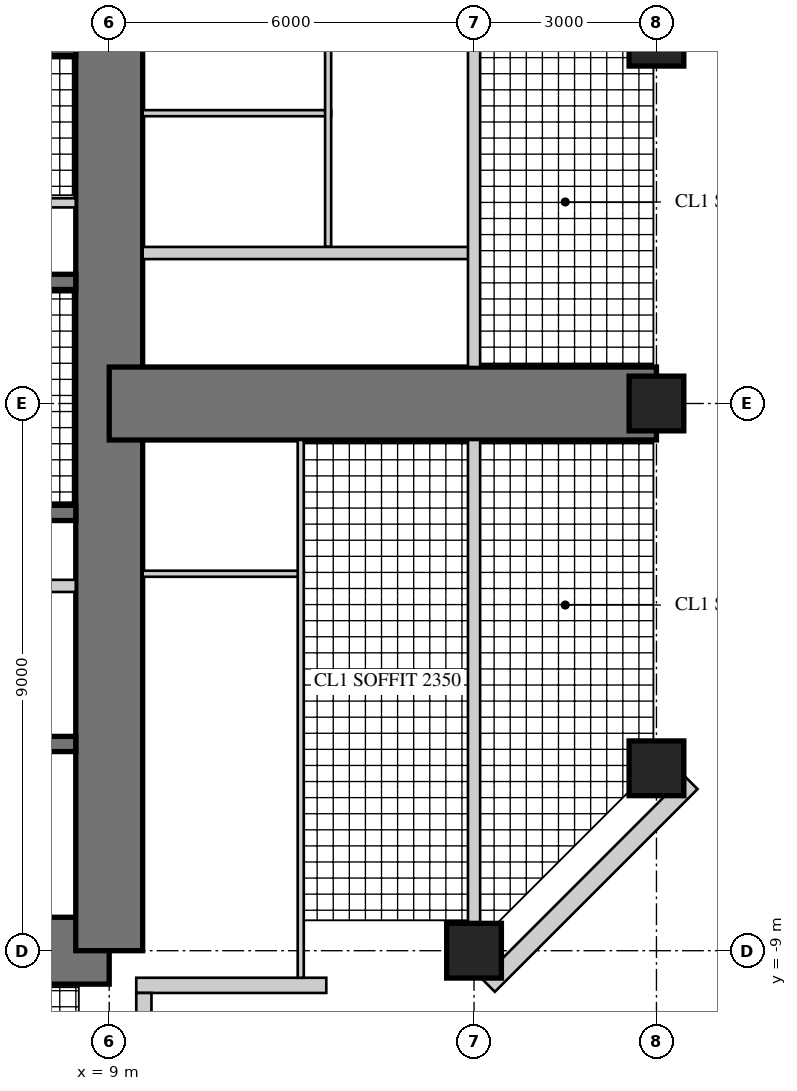
"""IFC4 building model, lengths in metres.
Left out: names, types, materials, properties, quantities, classifications, styles, units other than length and angle.
Written with IfcOpenShell. Run it as: python <this file> out.ifc"""

import sys

from ifc_helpers import new_model, si_unit, direction, frame, frame_2d, origin, origin_2d, place, context, subcontext, project, spatial, rectangle, hollow_rectangle, extrude, element, fill, save


model = new_model("IFC4")
c1 = context("Model", 3, precision=1e-05, world=origin(), true_north=direction((0.0, 1.0)))
c2 = subcontext(c1, "Body", "Model", "MODEL_VIEW")
j1 = project(units=[si_unit("LENGTHUNIT", "METRE"), si_unit("PLANEANGLEUNIT", "RADIAN")], contexts=[c1])
p1 = place(None, origin())
s1 = spatial("IfcSite", under=j1, at=p1, CompositionType="ELEMENT")
p2 = place(p1, origin())
s2 = spatial("IfcBuilding", under=s1, at=p2, CompositionType="ELEMENT")
p3 = place(p2, frame((0.0, 0.0, 179.7)))
s3 = spatial("IfcBuildingStorey", under=s2, at=p3, CompositionType="ELEMENT", Elevation=179.7)
p4 = place(p3, frame((-9.0, -9.0, 0.0), z_axis=(0.0, 0.0, 1.0), x_axis=(1.0, 0.0, 0.0)))
e1 = element("IfcWall", 1, at=p4, inside=s3, PredefinedType="SHEAR", context=c2, shape_type="SweptSolid", body=[
    extrude(rectangle(XDim=18.0, YDim=1.1, at=frame_2d((9.0, 0.0))), origin(), (0.0, 0.0, 1.0), 3.4),
])
p5 = place(p4, frame((9.8, 0.0, 0.0)))
e2 = element("IfcOpeningElement", 2, at=p5, cuts=e1, PredefinedType="OPENING", context=c2, shape_type="SweptSolid", body=[
    extrude(rectangle(XDim=1.0, YDim=2.4, at=frame_2d((0.5, 1.2))), frame((0.0, 0.56, 0.0), z_axis=(0.0, -1.0, 0.0), x_axis=(1.0, 0.0, 0.0)), (0.0, 0.0, 1.0), 1.12),
])
p6 = place(p3, frame((9.0, -9.0, 0.0), z_axis=(0.0, 0.0, 1.0), x_axis=(0.0, 1.0, 0.0)))
e3 = element("IfcWall", 3, at=p6, inside=s3, PredefinedType="SHEAR", context=c2, shape_type="SweptSolid", body=[
    extrude(rectangle(XDim=18.0, YDim=1.1, at=frame_2d((9.0, 0.0))), origin(), (0.0, 0.0, 1.0), 3.4),
])
p7 = place(p6, frame((9.8, 0.0, 0.0)))
e4 = element("IfcOpeningElement", 4, at=p7, cuts=e3, PredefinedType="OPENING", context=c2, shape_type="SweptSolid", body=[
    extrude(rectangle(XDim=1.0, YDim=2.4, at=frame_2d((0.5, 1.2))), frame((0.0, 0.56, 0.0), z_axis=(0.0, -1.0, 0.0), x_axis=(1.0, 0.0, 0.0)), (0.0, 0.0, 1.0), 1.12),
])
p8 = place(p3, frame((1.925, 2.0, 0.0), z_axis=(0.0, 0.0, 1.0), x_axis=(1.0, 0.0, 0.0)))
e5 = element("IfcWall", 5, at=p8, inside=s3, PredefinedType="SHEAR", context=c2, shape_type="SweptSolid", body=[
    extrude(rectangle(XDim=6.525, YDim=0.25, at=frame_2d((3.262, 0.0))), origin(), (0.0, 0.0, 1.0), 3.4),
])
p9 = place(p3, frame((1.925, 5.85, 0.0), z_axis=(0.0, 0.0, 1.0), x_axis=(1.0, 0.0, 0.0)))
e6 = element("IfcWall", 6, at=p9, inside=s3, PredefinedType="SHEAR", context=c2, shape_type="SweptSolid", body=[
    extrude(rectangle(XDim=6.525, YDim=0.25, at=frame_2d((3.262, 0.0))), origin(), (0.0, 0.0, 1.0), 3.4),
])
p10 = place(p9, frame((0.521, 0.0, 0.0)))
e7 = element("IfcOpeningElement", 7, at=p10, cuts=e6, PredefinedType="OPENING", context=c2, shape_type="SweptSolid", body=[
    extrude(rectangle(XDim=1.0, YDim=2.1, at=frame_2d((0.5, 1.05))), frame((0.0, 0.135, 0.0), z_axis=(0.0, -1.0, 0.0), x_axis=(1.0, 0.0, 0.0)), (0.0, 0.0, 1.0), 0.27),
])
p11 = place(p3, frame((1.925, 3.3, 0.0), z_axis=(0.0, 0.0, 1.0), x_axis=(1.0, 0.0, 0.0)))
e8 = element("IfcWall", 8, at=p11, inside=s3, PredefinedType="PARTITIONING", context=c2, shape_type="SweptSolid", body=[
    extrude(rectangle(XDim=6.525, YDim=0.15, at=frame_2d((3.262, 0.0))), origin(), (0.0, 0.0, 1.0), 3.4),
])
p12 = place(p11, frame((0.075, 0.0, 0.0)))
e9 = element("IfcOpeningElement", 9, at=p12, cuts=e8, PredefinedType="OPENING", context=c2, shape_type="SweptSolid", body=[
    extrude(rectangle(XDim=0.8, YDim=2.1, at=frame_2d((0.4, 1.05))), frame((0.0, 0.085, 0.0), z_axis=(0.0, -1.0, 0.0), x_axis=(1.0, 0.0, 0.0)), (0.0, 0.0, 1.0), 0.17),
])
p13 = place(p11, frame((3.675, 0.0, 0.0)))
e10 = element("IfcOpeningElement", 10, at=p13, cuts=e8, PredefinedType="OPENING", context=c2, shape_type="SweptSolid", body=[
    extrude(rectangle(XDim=0.8, YDim=2.1, at=frame_2d((0.4, 1.05))), frame((0.0, 0.085, 0.0), z_axis=(0.0, -1.0, 0.0), x_axis=(1.0, 0.0, 0.0)), (0.0, 0.0, 1.0), 0.17),
])
p14 = place(p3, frame((2.125, -1.8, 0.0), z_axis=(0.0, 0.0, 1.0), x_axis=(1.0, 0.0, 0.0)))
e11 = element("IfcWall", 11, at=p14, inside=s3, PredefinedType="SHEAR", context=c2, shape_type="SweptSolid", body=[
    extrude(rectangle(XDim=6.325, YDim=0.25, at=frame_2d((3.163, 0.0))), origin(), (0.0, 0.0, 1.0), 3.4),
])
p15 = place(p3, frame((2.125, -5.6, 0.0), z_axis=(0.0, 0.0, 1.0), x_axis=(1.0, 0.0, 0.0)))
e12 = element("IfcWall", 12, at=p15, inside=s3, PredefinedType="SHEAR", context=c2, shape_type="SweptSolid", body=[
    extrude(rectangle(XDim=6.325, YDim=0.25, at=frame_2d((3.163, 0.0))), origin(), (0.0, 0.0, 1.0), 3.4),
])
p16 = place(p15, frame((0.175, 0.0, 0.0)))
e13 = element("IfcOpeningElement", 13, at=p16, cuts=e12, PredefinedType="OPENING", context=c2, shape_type="SweptSolid", body=[
    extrude(rectangle(XDim=1.0, YDim=2.1, at=frame_2d((0.5, 1.05))), frame((0.0, 0.135, 0.0), z_axis=(0.0, -1.0, 0.0), x_axis=(1.0, 0.0, 0.0)), (0.0, 0.0, 1.0), 0.27),
])
p17 = place(p3, frame((5.725, -3.0, 0.0), z_axis=(0.0, 0.0, 1.0), x_axis=(1.0, 0.0, 0.0)))
e14 = element("IfcWall", 14, at=p17, inside=s3, PredefinedType="PARTITIONING", context=c2, shape_type="SweptSolid", body=[
    extrude(rectangle(XDim=2.725, YDim=0.2, at=frame_2d((1.362, 0.0))), origin(), (0.0, 0.0, 1.0), 3.4),
])
p18 = place(p3, frame((9.0, 0.0, 0.0), z_axis=(0.0, 0.0, 1.0), x_axis=(1.0, 0.0, 0.0)))
e15 = element("IfcWall", 15, at=p18, inside=s3, PredefinedType="SHEAR", context=c2, shape_type="SweptSolid", body=[
    extrude(rectangle(XDim=9.0, YDim=1.2, at=frame_2d((4.5, 0.0))), origin(), (0.0, 0.0, 1.0), 3.4),
])
p19 = place(p18, frame((3.95, 0.0, 0.0)))
e16 = element("IfcOpeningElement", 16, at=p19, cuts=e15, PredefinedType="OPENING", context=c2, shape_type="SweptSolid", body=[
    extrude(rectangle(XDim=1.0, YDim=2.15, at=frame_2d((0.5, 1.075))), frame((0.0, 0.61, 0.0), z_axis=(0.0, -1.0, 0.0), x_axis=(1.0, 0.0, 0.0)), (0.0, 0.0, 1.0), 1.22),
])
p20 = place(p18, frame((7.0, 0.0, 0.0)))
e17 = element("IfcOpeningElement", 17, at=p20, cuts=e15, PredefinedType="OPENING", context=c2, shape_type="SweptSolid", body=[
    extrude(rectangle(XDim=1.0, YDim=2.2, at=frame_2d((0.5, 1.1))), frame((0.0, 0.61, 0.0), z_axis=(0.0, -1.0, 0.0), x_axis=(1.0, 0.0, 0.0)), (0.0, 0.0, 1.0), 1.22),
])
for number, where, z_axis, x_axis in (
    (18, (15.0, -9.0, 0.0), (0.0, 0.0, 1.0), (1.0, 0.0, 0.0)),
    (19, (18.0, -6.0, 0.0), (0.0, 0.0, 1.0), (1.0, 0.0, 0.0)),
    (20, (18.0, 0.0, 0.0), (0.0, 0.0, 1.0), (1.0, 0.0, 0.0)),
    (21, (18.0, 6.0, 0.0), (0.0, 0.0, 1.0), (1.0, 0.0, 0.0)),
):
    element("IfcColumn", number, at=place(p3, frame(where, z_axis=z_axis, x_axis=x_axis)), inside=s3, PredefinedType="COLUMN", context=c2, shape_type="SweptSolid", body=[
        extrude(rectangle(XDim=0.9, YDim=0.9, at=origin_2d()), origin(), (0.0, 0.0, 1.0), 3.4),
    ])
p21 = place(p3, frame((9.445, -9.57, 0.0), z_axis=(0.0, 0.0, 1.0), x_axis=(1.0, 0.0, 0.0)))
e22 = element("IfcWall", 22, at=p21, inside=s3, PredefinedType="SOLIDWALL", context=c2, shape_type="SweptSolid", body=[
    extrude(rectangle(XDim=3.125, YDim=0.25, at=frame_2d((1.562, 0.0))), origin(), (0.0, 0.0, 1.0), 3.22),
])
p22 = place(p21, frame((0.6, 0.0, 0.0)))
e23 = element("IfcOpeningElement", 23, at=p22, cuts=e22, PredefinedType="OPENING", context=c2, shape_type="SweptSolid", body=[
    extrude(rectangle(XDim=1.0, YDim=2.2, at=frame_2d((0.5, 1.1))), frame((0.0, 0.135, 0.0), z_axis=(0.0, -1.0, 0.0), x_axis=(1.0, 0.0, 0.0)), (0.0, 0.0, 1.0), 0.27),
])
p23 = place(p3, frame((15.236, -9.57, 0.0), z_axis=(0.0, 0.0, 1.0), x_axis=(0.707106781187, 0.707106781187, 0.0)))
e24 = element("IfcWall", 24, at=p23, inside=s3, PredefinedType="SOLIDWALL", context=c2, shape_type="SweptSolid", body=[
    extrude(rectangle(XDim=4.715, YDim=0.3, at=frame_2d((2.357, 0.0))), origin(), (0.0, 0.0, 1.0), 3.22),
])
p24 = place(p23, frame((1.907, 0.0, 0.3)))
e25 = element("IfcOpeningElement", 25, at=p24, cuts=e24, PredefinedType="OPENING", context=c2, shape_type="SweptSolid", body=[
    extrude(rectangle(XDim=0.9, YDim=2.4, at=frame_2d((0.45, 1.2))), frame((0.0, 0.16, 0.0), z_axis=(0.0, -1.0, 0.0), x_axis=(1.0, 0.0, 0.0)), (0.0, 0.0, 1.0), 0.32),
])
p25 = place(p3, frame((9.57, -12.57, 0.0), z_axis=(0.0, 0.0, 1.0), x_axis=(0.0, 1.0, 0.0)))
e26 = element("IfcWall", 26, at=p25, inside=s3, PredefinedType="SOLIDWALL", context=c2, shape_type="SweptSolid", body=[
    extrude(rectangle(XDim=2.875, YDim=0.25, at=frame_2d((1.438, 0.0))), origin(), (0.0, 0.0, 1.0), 3.22),
])
p26 = place(p25, frame((0.6, 0.0, 0.0)))
e27 = element("IfcOpeningElement", 27, at=p26, cuts=e26, PredefinedType="OPENING", context=c2, shape_type="SweptSolid", body=[
    extrude(rectangle(XDim=1.0, YDim=2.2, at=frame_2d((0.5, 1.1))), frame((0.0, 0.135, 0.0), z_axis=(0.0, -1.0, 0.0), x_axis=(1.0, 0.0, 0.0)), (0.0, 0.0, 1.0), 0.27),
])
p27 = place(p3, frame((9.55, 4.775, 0.0), z_axis=(0.0, 0.0, 1.0), x_axis=(1.0, 0.0, 0.0)))
e28 = element("IfcWall", 28, at=p27, inside=s3, PredefinedType="PARTITIONING", context=c2, shape_type="SweptSolid", body=[
    extrude(rectangle(XDim=3.1, YDim=0.1, at=frame_2d((1.55, 0.0))), origin(), (0.0, 0.0, 1.0), 3.22),
])
p28 = place(p3, frame((12.6, 2.575, 0.0), z_axis=(0.0, 0.0, 1.0), x_axis=(0.0, 1.0, 0.0)))
e29 = element("IfcWall", 29, at=p28, inside=s3, PredefinedType="PARTITIONING", context=c2, shape_type="SweptSolid", body=[
    extrude(rectangle(XDim=6.87, YDim=0.1, at=frame_2d((3.435, 0.0))), origin(), (0.0, 0.0, 1.0), 3.22),
])
p29 = place(p28, frame((0.55, 0.0, 0.0)))
e30 = element("IfcOpeningElement", 30, at=p29, cuts=e29, PredefinedType="OPENING", context=c2, shape_type="SweptSolid", body=[
    extrude(rectangle(XDim=0.9, YDim=2.1, at=frame_2d((0.45, 1.05))), frame((0.0, 0.06, 0.0), z_axis=(0.0, -1.0, 0.0), x_axis=(1.0, 0.0, 0.0)), (0.0, 0.0, 1.0), 0.12),
])
p30 = place(p28, frame((2.65, 0.0, 0.0)))
e31 = element("IfcOpeningElement", 31, at=p30, cuts=e29, PredefinedType="OPENING", context=c2, shape_type="SweptSolid", body=[
    extrude(rectangle(XDim=0.9, YDim=2.1, at=frame_2d((0.45, 1.05))), frame((0.0, 0.06, 0.0), z_axis=(0.0, -1.0, 0.0), x_axis=(1.0, 0.0, 0.0)), (0.0, 0.0, 1.0), 0.12),
])
p31 = place(p3, frame((9.55, -2.8, 0.0), z_axis=(0.0, 0.0, 1.0), x_axis=(1.0, 0.0, 0.0)))
e32 = element("IfcWall", 32, at=p31, inside=s3, PredefinedType="PARTITIONING", context=c2, shape_type="SweptSolid", body=[
    extrude(rectangle(XDim=2.65, YDim=0.1, at=frame_2d((1.325, 0.0))), origin(), (0.0, 0.0, 1.0), 3.22),
])
p32 = place(p3, frame((12.15, -9.445, 0.0), z_axis=(0.0, 0.0, 1.0), x_axis=(0.0, 1.0, 0.0)))
e33 = element("IfcWall", 33, at=p32, inside=s3, PredefinedType="PARTITIONING", context=c2, shape_type="SweptSolid", body=[
    extrude(rectangle(XDim=8.845, YDim=0.1, at=frame_2d((4.422, 0.0))), origin(), (0.0, 0.0, 1.0), 3.22),
])
p33 = place(p32, frame((5.295, 0.0, 0.0)))
e34 = element("IfcOpeningElement", 34, at=p33, cuts=e33, PredefinedType="OPENING", context=c2, shape_type="SweptSolid", body=[
    extrude(rectangle(XDim=0.9, YDim=2.1, at=frame_2d((0.45, 1.05))), frame((0.0, 0.06, 0.0), z_axis=(0.0, -1.0, 0.0), x_axis=(1.0, 0.0, 0.0)), (0.0, 0.0, 1.0), 0.12),
])
p34 = place(p32, frame((7.395, 0.0, 0.0)))
e35 = element("IfcOpeningElement", 35, at=p34, cuts=e33, PredefinedType="OPENING", context=c2, shape_type="SweptSolid", body=[
    extrude(rectangle(XDim=0.9, YDim=2.1, at=frame_2d((0.45, 1.05))), frame((0.0, 0.06, 0.0), z_axis=(0.0, -1.0, 0.0), x_axis=(1.0, 0.0, 0.0)), (0.0, 0.0, 1.0), 0.12),
])
p35 = place(p3, frame((9.55, 2.475, 0.0), z_axis=(0.0, 0.0, 1.0), x_axis=(1.0, 0.0, 0.0)))
e36 = element("IfcWall", 36, at=p35, inside=s3, PredefinedType="SOLIDWALL", context=c2, shape_type="SweptSolid", body=[
    extrude(rectangle(XDim=5.45, YDim=0.2, at=frame_2d((2.725, 0.0))), origin(), (0.0, 0.0, 1.0), 3.22),
])
p36 = place(p35, frame((3.6, 0.0, 0.0)))
e37 = element("IfcOpeningElement", 37, at=p36, cuts=e36, PredefinedType="OPENING", context=c2, shape_type="SweptSolid", body=[
    extrude(rectangle(XDim=1.0, YDim=2.15, at=frame_2d((0.5, 1.075))), frame((0.0, 0.11, 0.0), z_axis=(0.0, -1.0, 0.0), x_axis=(1.0, 0.0, 0.0)), (0.0, 0.0, 1.0), 0.22),
])
p37 = place(p3, frame((15.0, -8.55, 0.0), z_axis=(0.0, 0.0, 1.0), x_axis=(0.0, 1.0, 0.0)))
e38 = element("IfcWall", 38, at=p37, inside=s3, PredefinedType="SOLIDWALL", context=c2, shape_type="SweptSolid", body=[
    extrude(rectangle(XDim=7.95, YDim=0.2, at=frame_2d((3.975, 0.0))), origin(), (0.0, 0.0, 1.0), 2.47),
])
p38 = place(p3, frame((15.0, 0.6, 0.0), z_axis=(0.0, 0.0, 1.0), x_axis=(0.0, 1.0, 0.0)))
e39 = element("IfcWall", 39, at=p38, inside=s3, PredefinedType="SOLIDWALL", context=c2, shape_type="SweptSolid", body=[
    extrude(rectangle(XDim=7.95, YDim=0.2, at=frame_2d((3.975, 0.0))), origin(), (0.0, 0.0, 1.0), 2.47),
])
p39 = place(p38, frame((0.35, 0.0, 0.0)))
e40 = element("IfcOpeningElement", 40, at=p39, cuts=e39, PredefinedType="OPENING", context=c2, shape_type="SweptSolid", body=[
    extrude(rectangle(XDim=1.0, YDim=2.2, at=frame_2d((0.5, 1.1))), frame((0.0, 0.11, 0.0), z_axis=(0.0, -1.0, 0.0), x_axis=(1.0, 0.0, 0.0)), (0.0, 0.0, 1.0), 0.22),
])
p40 = place(p22, origin())
e41 = element("IfcDoor", 41, at=p40, inside=s3, OperationType="SINGLE_SWING_LEFT", PredefinedType="DOOR", context=c2, shape_type="SweptSolid", body=[
    extrude(hollow_rectangle(XDim=1.0, YDim=2.2, WallThickness=0.06, at=frame_2d((0.5, 1.1))), frame((0.0, 0.025, 0.0), z_axis=(0.0, -1.0, 0.0), x_axis=(1.0, 0.0, 0.0)), (0.0, 0.0, 1.0), 0.05),
    extrude(rectangle(XDim=0.879, YDim=2.079, at=frame_2d((0.5, 1.1))), frame((0.0, 0.025, 0.0), z_axis=(0.0, -1.0, 0.0), x_axis=(1.0, 0.0, 0.0)), (0.0, 0.0, 1.0), 0.05),
])
fill(e23, e41)
p41 = place(p24, origin())
e42 = element("IfcWindow", 42, at=p41, inside=s3, PartitioningType="SINGLE_PANEL", PredefinedType="WINDOW", context=c2, shape_type="SweptSolid", body=[
    extrude(hollow_rectangle(XDim=0.9, YDim=2.4, WallThickness=0.06, at=frame_2d((0.45, 1.2))), frame((0.0, 0.03, 0.0), z_axis=(0.0, -1.0, 0.0), x_axis=(1.0, 0.0, 0.0)), (0.0, 0.0, 1.0), 0.06),
    extrude(rectangle(XDim=0.779, YDim=2.279, at=frame_2d((0.45, 1.2))), frame((0.0, 0.03, 0.0), z_axis=(0.0, -1.0, 0.0), x_axis=(1.0, 0.0, 0.0)), (0.0, 0.0, 1.0), 0.06),
])
fill(e25, e42)
p42 = place(p29, origin())
e43 = element("IfcDoor", 43, at=p42, inside=s3, OperationType="SINGLE_SWING_LEFT", PredefinedType="DOOR", context=c2, shape_type="SweptSolid", body=[
    extrude(rectangle(XDim=0.9, YDim=2.1, at=frame_2d((0.45, 1.05))), frame((0.0, 0.025, 0.0), z_axis=(0.0, -1.0, 0.0), x_axis=(1.0, 0.0, 0.0)), (0.0, 0.0, 1.0), 0.05),
])
fill(e30, e43)
p43 = place(p30, origin())
e44 = element("IfcDoor", 44, at=p43, inside=s3, OperationType="SINGLE_SWING_LEFT", PredefinedType="DOOR", context=c2, shape_type="SweptSolid", body=[
    extrude(rectangle(XDim=0.9, YDim=2.1, at=frame_2d((0.45, 1.05))), frame((0.0, 0.025, 0.0), z_axis=(0.0, -1.0, 0.0), x_axis=(1.0, 0.0, 0.0)), (0.0, 0.0, 1.0), 0.05),
])
fill(e31, e44)
p44 = place(p33, origin())
e45 = element("IfcDoor", 45, at=p44, inside=s3, OperationType="SINGLE_SWING_RIGHT", PredefinedType="DOOR", context=c2, shape_type="SweptSolid", body=[
    extrude(rectangle(XDim=0.9, YDim=2.1, at=frame_2d((0.45, 1.05))), frame((0.0, 0.025, 0.0), z_axis=(0.0, -1.0, 0.0), x_axis=(1.0, 0.0, 0.0)), (0.0, 0.0, 1.0), 0.05),
])
fill(e34, e45)
p45 = place(p34, origin())
e46 = element("IfcDoor", 46, at=p45, inside=s3, OperationType="SINGLE_SWING_RIGHT", PredefinedType="DOOR", context=c2, shape_type="SweptSolid", body=[
    extrude(rectangle(XDim=0.9, YDim=2.1, at=frame_2d((0.45, 1.05))), frame((0.0, 0.025, 0.0), z_axis=(0.0, -1.0, 0.0), x_axis=(1.0, 0.0, 0.0)), (0.0, 0.0, 1.0), 0.05),
])
fill(e35, e46)
p46 = place(p36, origin())
e47 = element("IfcDoor", 47, at=p46, inside=s3, OperationType="SINGLE_SWING_LEFT", PredefinedType="DOOR", context=c2, shape_type="SweptSolid", body=[
    extrude(rectangle(XDim=1.0, YDim=2.15, at=frame_2d((0.5, 1.075))), frame((0.0, 0.025, 0.0), z_axis=(0.0, -1.0, 0.0), x_axis=(1.0, 0.0, 0.0)), (0.0, 0.0, 1.0), 0.05),
])
fill(e37, e47)
p47 = place(p39, frame((1.0, 0.0, 0.0), z_axis=(0.0, 0.0, 1.0), x_axis=(-1.0, 0.0, 0.0)))
e48 = element("IfcDoor", 48, at=p47, inside=s3, OperationType="SINGLE_SWING_LEFT", PredefinedType="DOOR", context=c2, shape_type="SweptSolid", body=[
    extrude(rectangle(XDim=1.0, YDim=2.2, at=frame_2d((0.5, 1.1))), frame((0.0, 0.025, 0.0), z_axis=(0.0, -1.0, 0.0), x_axis=(1.0, 0.0, 0.0)), (0.0, 0.0, 1.0), 0.05),
])
fill(e40, e48)
p48 = place(p19, frame((1.0, 0.0, 0.0), z_axis=(0.0, 0.0, 1.0), x_axis=(-1.0, 0.0, 0.0)))
e49 = element("IfcDoor", 49, at=p48, inside=s3, OperationType="SINGLE_SWING_RIGHT", PredefinedType="DOOR", context=c2, shape_type="SweptSolid", body=[
    extrude(rectangle(XDim=1.0, YDim=2.15, at=frame_2d((0.5, 1.075))), frame((0.0, 0.025, 0.0), z_axis=(0.0, -1.0, 0.0), x_axis=(1.0, 0.0, 0.0)), (0.0, 0.0, 1.0), 0.05),
])
fill(e16, e49)
p49 = place(p20, origin())
e50 = element("IfcDoor", 50, at=p49, inside=s3, OperationType="SINGLE_SWING_LEFT", PredefinedType="DOOR", context=c2, shape_type="SweptSolid", body=[
    extrude(rectangle(XDim=1.0, YDim=2.2, at=frame_2d((0.5, 1.1))), frame((0.0, 0.025, 0.0), z_axis=(0.0, -1.0, 0.0), x_axis=(1.0, 0.0, 0.0)), (0.0, 0.0, 1.0), 0.05),
])
fill(e17, e50)
p50 = place(p7, origin())
e51 = element("IfcDoor", 51, at=p50, inside=s3, OperationType="SINGLE_SWING_RIGHT", PredefinedType="DOOR", context=c2, shape_type="SweptSolid", body=[
    extrude(rectangle(XDim=1.0, YDim=2.4, at=frame_2d((0.5, 1.2))), frame((0.0, 0.055, 0.0), z_axis=(0.0, -1.0, 0.0), x_axis=(1.0, 0.0, 0.0)), (0.0, 0.0, 1.0), 0.05),
])
fill(e4, e51)
save(model, sys.argv[1])
